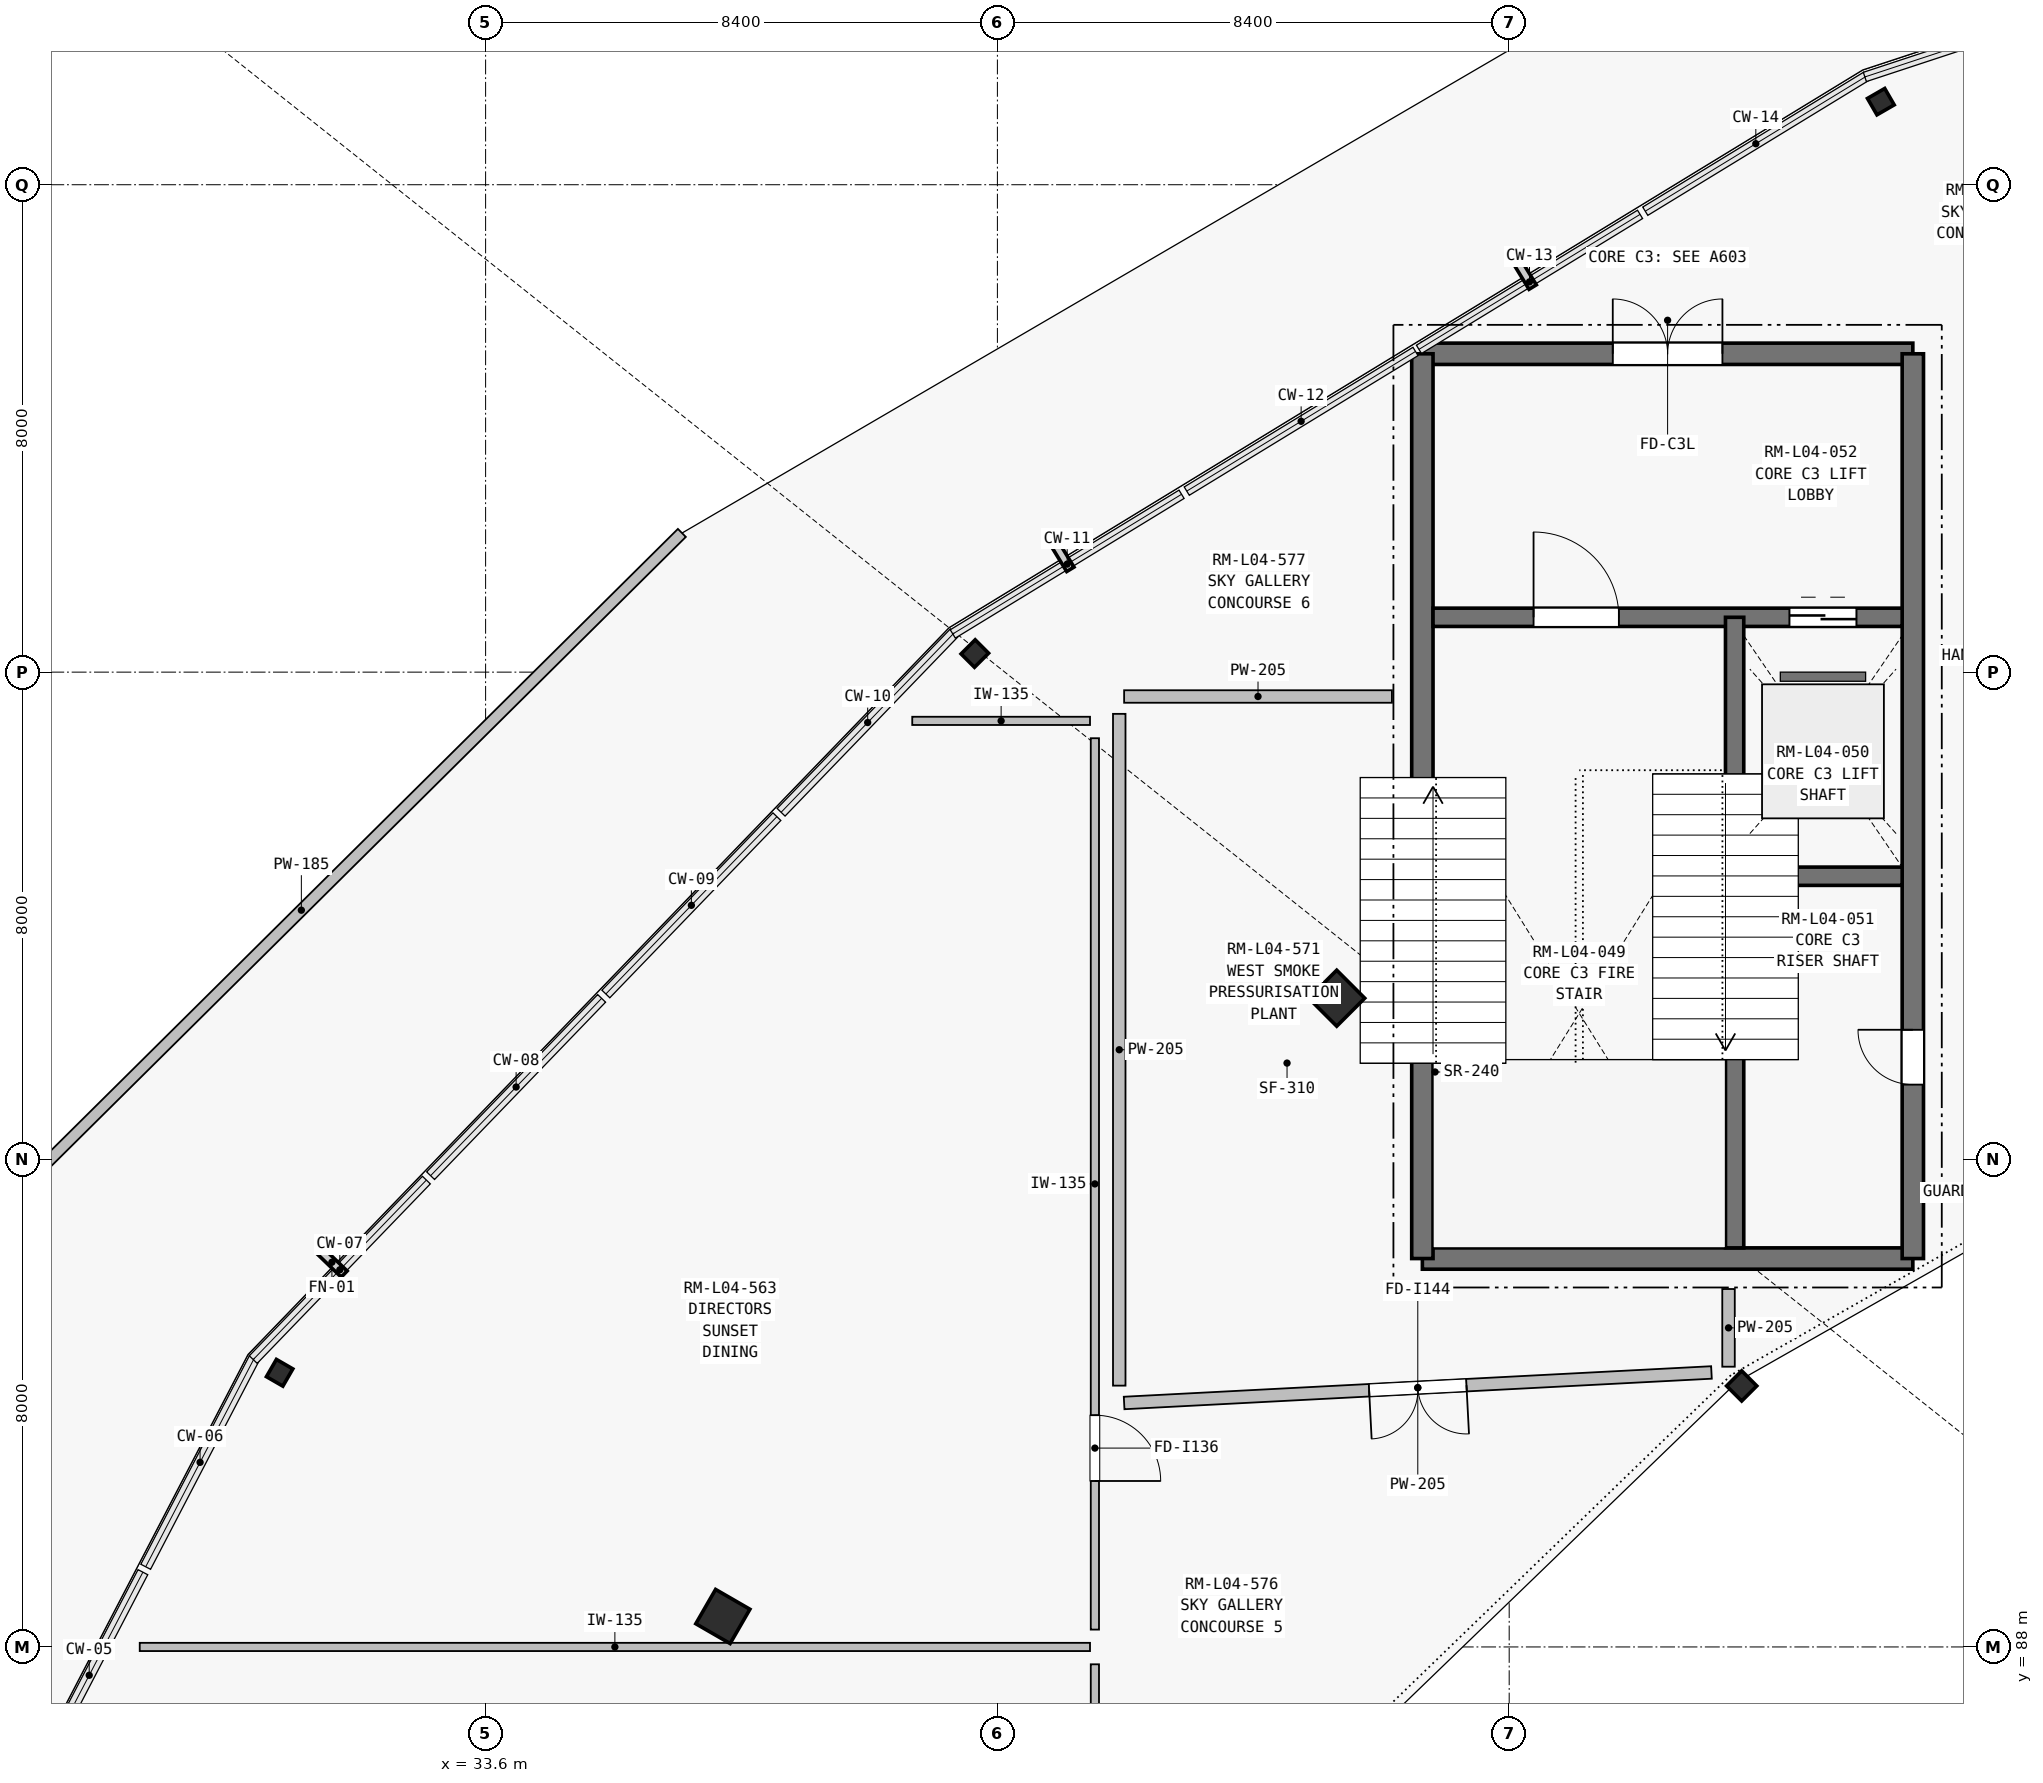
"""IFC4 building model, lengths in metres.
Left out: names, types, materials, properties, quantities, classifications, styles, units other than length and angle.
Written with IfcOpenShell. Run it as: python <this file> out.ifc"""

import sys

from ifc_helpers import new_model, si_unit, direction, frame, frame_2d, origin, origin_2d, place, context, subcontext, project, spatial, rectangle, i_section, extrude, element, fill, save


model = new_model("IFC4")
c1 = context("Model", 3, precision=1e-05, world=origin(), true_north=direction((0.0, 1.0)))
c2 = subcontext(c1, "Body", "Model", "MODEL_VIEW")
j1 = project(units=[si_unit("LENGTHUNIT", "METRE"), si_unit("PLANEANGLEUNIT", "RADIAN")], contexts=[c1])
p1 = place(None, origin())
s1 = spatial("IfcSite", under=j1, at=p1, CompositionType="ELEMENT")
p2 = place(p1, origin())
s2 = spatial("IfcBuilding", under=s1, at=p2, CompositionType="ELEMENT")
p3 = place(p2, frame((0.0, 0.0, 18.9)))
s3 = spatial("IfcBuildingStorey", under=s2, at=p3, CompositionType="ELEMENT", Elevation=18.9)
p4 = place(p3, frame((54.216, 92.284, 0.0), z_axis=(0.0, 0.0, 1.0), x_axis=(-0.707106781187, 0.707106781187, 0.0)))
e1 = element("IfcColumn", 1, at=p4, inside=s3, PredefinedType="COLUMN", context=c2, shape_type="SweptSolid", body=[
    extrude(i_section(OverallWidth=0.35, OverallDepth=0.35, WebThickness=0.014, FlangeThickness=0.024, at=origin_2d()), origin(), (0.0, 0.0, 1.0), 4.5),
])
for number, where, z_axis, x_axis in (
    (2, (47.569, 98.648, 0.0), (0.0, 0.0, 1.0), (-0.707, 0.707, 0.0)),
    (3, (37.494, 88.5, 0.0), (0.0, 0.0, 1.0), (-0.866, 0.5, 0.0)),
):
    element("IfcColumn", number, at=place(p3, frame(where, z_axis=z_axis, x_axis=x_axis)), inside=s3, PredefinedType="COLUMN", context=c2, shape_type="SweptSolid", body=[
        extrude(rectangle(XDim=0.65, YDim=0.65, at=origin_2d()), origin(), (0.0, 0.0, 1.0), 4.5),
    ])
for number, where, z_axis, x_axis in (
    (4, (56.5, 113.363, 0.0), (0.0, 0.0, 1.0), (-0.5, 0.866, 0.0)),
    (5, (41.63, 104.305, 0.0), (0.0, 0.0, 1.0), (-0.707, 0.707, 0.0)),
    (6, (30.219, 92.5, 0.0), (0.0, 0.0, 1.0), (-0.866, 0.5, 0.0)),
):
    element("IfcColumn", number, at=place(p3, frame(where, z_axis=z_axis, x_axis=x_axis)), inside=s3, PredefinedType="COLUMN", context=c2, shape_type="SweptSolid", body=[
        extrude(i_section(OverallWidth=0.311, OverallDepth=0.327, WebThickness=0.016, FlangeThickness=0.025, at=origin_2d()), origin(), (0.0, 0.0, 1.0), 4.5),
    ])
p5 = place(p3, frame((24.33, 93.9, 0.0), z_axis=(0.0, 0.0, 1.0), x_axis=(0.710112198636, 0.704088535164, 0.0)))
e7 = element("IfcWall", 7, at=p5, inside=s3, PredefinedType="PARAPET", context=c2, shape_type="SweptSolid", body=[
    extrude(rectangle(XDim=17.59, YDim=0.185, at=frame_2d((8.795, 0.0))), origin(), (0.0, 0.0, 1.0), 0.85),
])
p6 = place(p3, frame((48.975, 94.375, 0.0), z_axis=(0.0, 0.0, 1.0), x_axis=(1.0, 0.0, 0.0)))
e8 = element("IfcWall", 8, at=p6, inside=s3, PredefinedType="SHEAR", context=c2, shape_type="SweptSolid", body=[
    extrude(rectangle(XDim=8.05, YDim=0.35, at=frame_2d((4.025, 0.0))), origin(), (0.0, 0.0, 1.0), 4.5),
])
p7 = place(p3, frame((48.975, 109.225, 0.0), z_axis=(0.0, 0.0, 1.0), x_axis=(1.0, 0.0, 0.0)))
e9 = element("IfcWall", 9, at=p7, inside=s3, PredefinedType="SHEAR", context=c2, shape_type="SweptSolid", body=[
    extrude(rectangle(XDim=8.05, YDim=0.35, at=frame_2d((4.025, 0.0))), origin(), (0.0, 0.0, 1.0), 4.5),
])
p8 = place(p7, frame((3.125, 0.0, 0.0)))
e10 = element("IfcOpeningElement", 10, at=p8, cuts=e9, PredefinedType="OPENING", context=c2, shape_type="SweptSolid", body=[
    extrude(rectangle(XDim=1.8, YDim=2.25, at=frame_2d((0.9, 1.125))), frame((0.0, 0.185, 0.0), z_axis=(0.0, -1.0, 0.0), x_axis=(1.0, 0.0, 0.0)), (0.0, 0.0, 1.0), 0.37),
])
p9 = place(p3, frame((48.975, 94.375, 0.0), z_axis=(0.0, 0.0, 1.0), x_axis=(0.0, 1.0, 0.0)))
e11 = element("IfcWall", 11, at=p9, inside=s3, PredefinedType="SHEAR", context=c2, shape_type="SweptSolid", body=[
    extrude(rectangle(XDim=14.85, YDim=0.35, at=frame_2d((7.425, 0.0))), origin(), (0.0, 0.0, 1.0), 4.5),
])
p10 = place(p3, frame((57.025, 94.375, 0.0), z_axis=(0.0, 0.0, 1.0), x_axis=(0.0, 1.0, 0.0)))
e12 = element("IfcWall", 12, at=p10, inside=s3, PredefinedType="SHEAR", context=c2, shape_type="SweptSolid", body=[
    extrude(rectangle(XDim=14.85, YDim=0.35, at=frame_2d((7.425, 0.0))), origin(), (0.0, 0.0, 1.0), 4.5),
])
p11 = place(p10, frame((2.855, 0.0, 0.0)))
e13 = element("IfcOpeningElement", 13, at=p11, cuts=e12, PredefinedType="OPENING", context=c2, shape_type="SweptSolid", body=[
    extrude(rectangle(XDim=0.9, YDim=2.1, at=frame_2d((0.45, 1.05))), frame((0.0, 0.185, 0.0), z_axis=(0.0, -1.0, 0.0), x_axis=(1.0, 0.0, 0.0)), (0.0, 0.0, 1.0), 0.37),
])
p12 = place(p3, frame((49.15, 104.9, 0.0), z_axis=(0.0, 0.0, 1.0), x_axis=(1.0, 0.0, 0.0)))
e14 = element("IfcWall", 14, at=p12, inside=s3, PredefinedType="SHEAR", context=c2, shape_type="SweptSolid", body=[
    extrude(rectangle(XDim=7.7, YDim=0.3, at=frame_2d((3.85, 0.0))), origin(), (0.0, 0.0, 1.0), 4.5),
])
p13 = place(p12, frame((1.65, 0.0, 0.0)))
e15 = element("IfcOpeningElement", 15, at=p13, cuts=e14, PredefinedType="OPENING", context=c2, shape_type="SweptSolid", body=[
    extrude(rectangle(XDim=1.4, YDim=2.2, at=frame_2d((0.7, 1.1))), frame((0.0, 0.16, 0.0), z_axis=(0.0, -1.0, 0.0), x_axis=(1.0, 0.0, 0.0)), (0.0, 0.0, 1.0), 0.32),
])
p14 = place(p12, frame((5.85, 0.0, 0.0)))
e16 = element("IfcOpeningElement", 16, at=p14, cuts=e14, PredefinedType="OPENING", context=c2, shape_type="SweptSolid", body=[
    extrude(rectangle(XDim=1.1, YDim=2.2, at=frame_2d((0.55, 1.1))), frame((0.0, 0.16, 0.0), z_axis=(0.0, -1.0, 0.0), x_axis=(1.0, 0.0, 0.0)), (0.0, 0.0, 1.0), 0.32),
])
p15 = place(p3, frame((54.1, 94.55, 0.0), z_axis=(0.0, 0.0, 1.0), x_axis=(0.0, 1.0, 0.0)))
e17 = element("IfcWall", 17, at=p15, inside=s3, PredefinedType="SHEAR", context=c2, shape_type="SweptSolid", body=[
    extrude(rectangle(XDim=10.35, YDim=0.3, at=frame_2d((5.175, 0.0))), origin(), (0.0, 0.0, 1.0), 4.5),
])
p16 = place(p3, frame((54.25, 100.65, 0.0), z_axis=(0.0, 0.0, 1.0), x_axis=(1.0, 0.0, 0.0)))
e18 = element("IfcWall", 18, at=p16, inside=s3, PredefinedType="SHEAR", context=c2, shape_type="SweptSolid", body=[
    extrude(rectangle(XDim=2.6, YDim=0.3, at=frame_2d((1.3, 0.0))), origin(), (0.0, 0.0, 1.0), 4.5),
])
p17 = place(p3, frame((27.923, 88.0, 0.0), z_axis=(0.0, 0.0, 1.0), x_axis=(1.0, 0.0, 0.0)))
e19 = element("IfcWall", 19, at=p17, inside=s3, PredefinedType="PARTITIONING", context=c2, shape_type="SweptSolid", body=[
    extrude(rectangle(XDim=15.597, YDim=0.135, at=frame_2d((7.798, 0.0))), origin(), (0.0, 0.0, 1.0), 3.662),
])
p18 = place(p3, frame((43.6, 87.715, 0.0), z_axis=(0.0, 0.0, 1.0), x_axis=(0.0, -1.0, 0.0)))
e20 = element("IfcWall", 20, at=p18, inside=s3, PredefinedType="PARTITIONING", context=c2, shape_type="SweptSolid", body=[
    extrude(rectangle(XDim=6.473, YDim=0.135, at=frame_2d((3.237, 0.0))), origin(), (0.0, 0.0, 1.0), 3.789),
])
p19 = place(p18, frame((1.176, 0.0, 0.0)))
e21 = element("IfcOpeningElement", 21, at=p19, cuts=e20, PredefinedType="OPENING", context=c2, shape_type="SweptSolid", body=[
    extrude(rectangle(XDim=1.95, YDim=2.4, at=frame_2d((0.975, 1.2))), frame((0.0, 0.077, 0.0), z_axis=(0.0, -1.0, 0.0), x_axis=(1.0, 0.0, 0.0)), (0.0, 0.0, 1.0), 0.155),
])
p20 = place(p3, frame((40.602, 103.2, 0.0), z_axis=(0.0, 0.0, 1.0), x_axis=(1.0, 0.0, 0.0)))
e22 = element("IfcWall", 22, at=p20, inside=s3, PredefinedType="PARTITIONING", context=c2, shape_type="SweptSolid", body=[
    extrude(rectangle(XDim=2.918, YDim=0.135, at=frame_2d((1.459, 0.0))), origin(), (0.0, 0.0, 1.0), 3.662),
])
p21 = place(p3, frame((43.6, 102.915, 0.0), z_axis=(0.0, 0.0, 1.0), x_axis=(0.0, -1.0, 0.0)))
e23 = element("IfcWall", 23, at=p21, inside=s3, PredefinedType="PARTITIONING", context=c2, shape_type="SweptSolid", body=[
    extrude(rectangle(XDim=14.63, YDim=0.135, at=frame_2d((7.315, 0.0))), origin(), (0.0, 0.0, 1.0), 3.662),
])
p22 = place(p21, frame((11.111, 0.0, 0.0)))
e24 = element("IfcOpeningElement", 24, at=p22, cuts=e23, PredefinedType="OPENING", context=c2, shape_type="SweptSolid", body=[
    extrude(rectangle(XDim=1.08, YDim=2.15, at=frame_2d((0.54, 1.075))), frame((0.0, 0.077, 0.0), z_axis=(0.0, -1.0, 0.0), x_axis=(1.0, 0.0, 0.0)), (0.0, 0.0, 1.0), 0.155),
])
p23 = place(p3, frame((44.08, 103.6, 0.0), z_axis=(0.0, 0.0, 1.0), x_axis=(1.0, 0.0, 0.0)))
e25 = element("IfcWall", 25, at=p23, inside=s3, PredefinedType="SOLIDWALL", context=c2, shape_type="SweptSolid", body=[
    extrude(rectangle(XDim=4.395, YDim=0.205, at=frame_2d((2.198, 0.0))), origin(), (0.0, 0.0, 1.0), 3.939),
])
p24 = place(p3, frame((54.0, 93.875, 0.0), z_axis=(0.0, 0.0, 1.0), x_axis=(0.0, -1.0, 0.0)))
e26 = element("IfcWall", 26, at=p24, inside=s3, PredefinedType="SOLIDWALL", context=c2, shape_type="SweptSolid", body=[
    extrude(rectangle(XDim=1.275, YDim=0.205, at=frame_2d((0.638, 0.0))), origin(), (0.0, 0.0, 1.0), 4.22),
])
p25 = place(p3, frame((53.72, 92.505, 0.0), z_axis=(0.0, 0.0, 1.0), x_axis=(-0.998652335412, -0.051899065272, 0.0)))
e27 = element("IfcWall", 27, at=p25, inside=s3, PredefinedType="SOLIDWALL", context=c2, shape_type="SweptSolid", body=[
    extrude(rectangle(XDim=9.653, YDim=0.205, at=frame_2d((4.826, 0.0))), origin(), (0.0, 0.0, 1.0), 4.22),
])
p26 = place(p25, frame((4.027, 0.0, 0.0)))
e28 = element("IfcOpeningElement", 28, at=p26, cuts=e27, PredefinedType="OPENING", context=c2, shape_type="SweptSolid", body=[
    extrude(rectangle(XDim=1.6, YDim=2.35, at=frame_2d((0.8, 1.175))), frame((0.0, 0.113, 0.0), z_axis=(0.0, -1.0, 0.0), x_axis=(1.0, 0.0, 0.0)), (0.0, 0.0, 1.0), 0.225),
])
p27 = place(p3, frame((44.0, 92.289, 0.0), z_axis=(0.0, 0.0, 1.0), x_axis=(0.0, 1.0, 0.0)))
e29 = element("IfcWall", 29, at=p27, inside=s3, PredefinedType="SOLIDWALL", context=c2, shape_type="SweptSolid", body=[
    extrude(rectangle(XDim=11.026, YDim=0.205, at=frame_2d((5.513, 0.0))), origin(), (0.0, 0.0, 1.0), 3.662),
])
p28 = place(p8, origin())
e30 = element("IfcDoor", 30, at=p28, inside=s3, OperationType="DOUBLE_DOOR_SINGLE_SWING", PredefinedType="DOOR", context=c2, shape_type="SweptSolid", body=[
    extrude(rectangle(XDim=1.8, YDim=2.25, at=frame_2d((0.9, 1.125))), frame((0.0, 0.025, 0.0), z_axis=(0.0, -1.0, 0.0), x_axis=(1.0, 0.0, 0.0)), (0.0, 0.0, 1.0), 0.05),
])
fill(e10, e30)
p29 = place(p13, origin())
e31 = element("IfcDoor", 31, at=p29, inside=s3, OperationType="SINGLE_SWING_LEFT", PredefinedType="DOOR", context=c2, shape_type="SweptSolid", body=[
    extrude(rectangle(XDim=1.4, YDim=2.2, at=frame_2d((0.7, 1.1))), frame((0.0, 0.025, 0.0), z_axis=(0.0, -1.0, 0.0), x_axis=(1.0, 0.0, 0.0)), (0.0, 0.0, 1.0), 0.05),
])
fill(e15, e31)
p30 = place(p11, origin())
e32 = element("IfcDoor", 32, at=p30, inside=s3, OperationType="SINGLE_SWING_RIGHT", PredefinedType="DOOR", context=c2, shape_type="SweptSolid", body=[
    extrude(rectangle(XDim=0.9, YDim=2.1, at=frame_2d((0.45, 1.05))), frame((0.0, 0.025, 0.0), z_axis=(0.0, -1.0, 0.0), x_axis=(1.0, 0.0, 0.0)), (0.0, 0.0, 1.0), 0.05),
])
fill(e13, e32)
p31 = place(p14, origin())
e33 = element("IfcDoor", 33, at=p31, inside=s3, OperationType="SLIDING_TO_LEFT", PredefinedType="DOOR", context=c2, shape_type="SweptSolid", body=[
    extrude(rectangle(XDim=1.1, YDim=2.2, at=frame_2d((0.55, 1.1))), frame((0.0, 0.025, 0.0), z_axis=(0.0, -1.0, 0.0), x_axis=(1.0, 0.0, 0.0)), (0.0, 0.0, 1.0), 0.05),
])
fill(e16, e33)
p32 = place(p22, origin())
e34 = element("IfcDoor", 34, at=p32, inside=s3, OperationType="SINGLE_SWING_RIGHT", PredefinedType="DOOR", context=c2, shape_type="SweptSolid", body=[
    extrude(rectangle(XDim=1.08, YDim=2.15, at=frame_2d((0.54, 1.075))), frame((0.0, 0.025, 0.0), z_axis=(0.0, -1.0, 0.0), x_axis=(1.0, 0.0, 0.0)), (0.0, 0.0, 1.0), 0.05),
])
fill(e24, e34)
p33 = place(p26, origin())
e35 = element("IfcDoor", 35, at=p33, inside=s3, OperationType="DOUBLE_DOOR_SINGLE_SWING", PredefinedType="DOOR", context=c2, shape_type="SweptSolid", body=[
    extrude(rectangle(XDim=1.6, YDim=2.35, at=frame_2d((0.8, 1.175))), frame((0.0, 0.025, 0.0), z_axis=(0.0, -1.0, 0.0), x_axis=(1.0, 0.0, 0.0)), (0.0, 0.0, 1.0), 0.05),
])
fill(e28, e35)
save(model, sys.argv[1])
